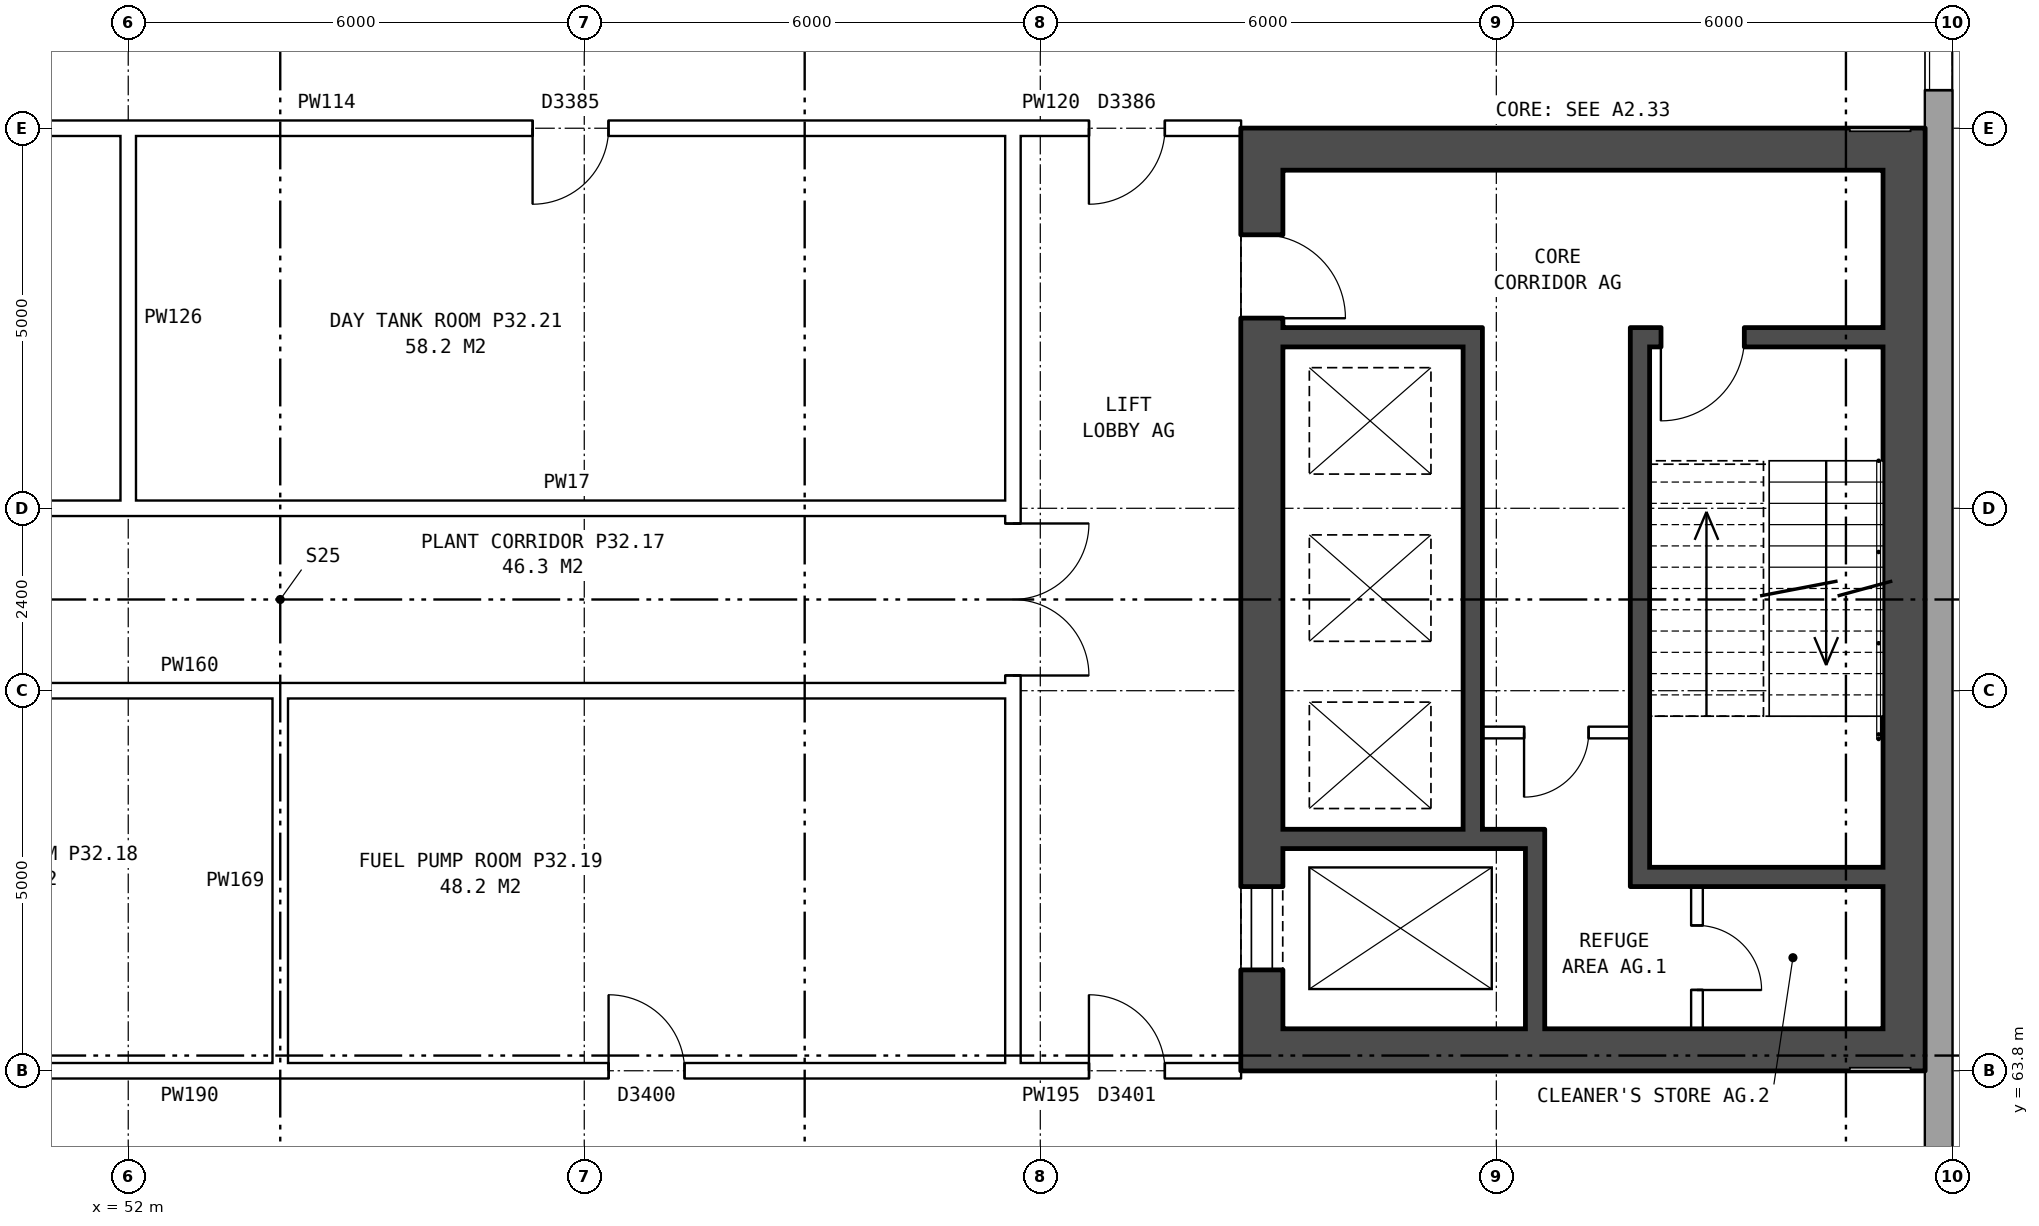
"""IFC4 building model, lengths in metres.
Left out: names, types, materials, properties, quantities, classifications, styles, units other than length and angle.
Written with IfcOpenShell. Run it as: python <this file> out.ifc"""

import sys

from ifc_helpers import new_model, si_unit, direction, frame, frame_2d, origin, place, context, subcontext, project, spatial, rectangle, extrude, element, fill, save


model = new_model("IFC4")
c1 = context("Model", 3, precision=1e-05, world=origin(), true_north=direction((0.0, 1.0)))
c2 = subcontext(c1, "Body", "Model", "MODEL_VIEW")
j1 = project(units=[si_unit("LENGTHUNIT", "METRE"), si_unit("PLANEANGLEUNIT", "RADIAN")], contexts=[c1])
p1 = place(None, origin())
s1 = spatial("IfcSite", under=j1, at=p1, CompositionType="ELEMENT")
p2 = place(p1, origin())
s2 = spatial("IfcBuilding", under=s1, at=p2, CompositionType="ELEMENT")
p3 = place(p2, frame((0.0, 0.0, 115.0)))
s3 = spatial("IfcBuildingStorey", under=s2, at=p3, CompositionType="ELEMENT", Elevation=115.0)
p4 = place(p3, frame((75.82, 57.075, 0.0), z_axis=(0.0, 0.0, 1.0), x_axis=(0.0, 1.0, 0.0)))
e1 = element("IfcWall", 1, at=p4, inside=s3, PredefinedType="STANDARD", context=c2, shape_type="SweptSolid", body=[
    extrude(rectangle(XDim=25.851, YDim=0.36, at=frame_2d((12.925, 0.0))), origin(), (0.0, 0.0, 1.0), 4.2),
])
p5 = place(p4, frame((2.9, 0.0, 1.5)))
e2 = element("IfcOpeningElement", 2, at=p5, cuts=e1, PredefinedType="OPENING", context=c2, shape_type="SweptSolid", body=[
    extrude(rectangle(XDim=0.6, YDim=1.2, at=frame_2d((0.3, 0.6))), frame((0.0, 0.19, 0.0), z_axis=(0.0, -1.0, 0.0), x_axis=(1.0, 0.0, 0.0)), (0.0, 0.0, 1.0), 0.38),
])
p6 = place(p4, frame((3.925, 0.0, 1.5)))
e3 = element("IfcOpeningElement", 3, at=p6, cuts=e1, PredefinedType="OPENING", context=c2, shape_type="SweptSolid", body=[
    extrude(rectangle(XDim=0.6, YDim=1.2, at=frame_2d((0.3, 0.6))), frame((0.0, 0.19, 0.0), z_axis=(0.0, -1.0, 0.0), x_axis=(1.0, 0.0, 0.0)), (0.0, 0.0, 1.0), 0.38),
])
p7 = place(p4, frame((19.625, 0.0, 1.5)))
e4 = element("IfcOpeningElement", 4, at=p7, cuts=e1, PredefinedType="OPENING", context=c2, shape_type="SweptSolid", body=[
    extrude(rectangle(XDim=1.6, YDim=1.2, at=frame_2d((0.8, 0.6))), frame((0.0, 0.19, 0.0), z_axis=(0.0, -1.0, 0.0), x_axis=(1.0, 0.0, 0.0)), (0.0, 0.0, 1.0), 0.38),
])
p8 = place(p4, frame((22.125, 0.0, 1.5)))
e5 = element("IfcOpeningElement", 5, at=p8, cuts=e1, PredefinedType="OPENING", context=c2, shape_type="SweptSolid", body=[
    extrude(rectangle(XDim=0.6, YDim=1.2, at=frame_2d((0.3, 0.6))), frame((0.0, 0.19, 0.0), z_axis=(0.0, -1.0, 0.0), x_axis=(1.0, 0.0, 0.0)), (0.0, 0.0, 1.0), 0.38),
])
p9 = place(p3, frame((66.915, 63.8, 0.0), z_axis=(0.0, 0.0, 1.0), x_axis=(0.0, 1.0, 0.0)))
e6 = element("IfcWall", 6, at=p9, inside=s3, PredefinedType="SHEAR", context=c2, shape_type="SweptSolid", body=[
    extrude(rectangle(XDim=12.4, YDim=0.55, at=frame_2d((6.2, 0.0))), origin(), (0.0, 0.0, 1.0), 4.2),
])
p10 = place(p9, frame((1.325, 0.0, 0.0)))
e7 = element("IfcOpeningElement", 7, at=p10, cuts=e6, PredefinedType="OPENING", context=c2, shape_type="SweptSolid", body=[
    extrude(rectangle(XDim=1.1, YDim=2.1, at=frame_2d((0.55, 1.05))), frame((0.0, 0.285, 0.0), z_axis=(0.0, -1.0, 0.0), x_axis=(1.0, 0.0, 0.0)), (0.0, 0.0, 1.0), 0.57),
])
p11 = place(p9, frame((9.9, 0.0, 0.0)))
e8 = element("IfcOpeningElement", 8, at=p11, cuts=e6, PredefinedType="OPENING", context=c2, shape_type="SweptSolid", body=[
    extrude(rectangle(XDim=1.1, YDim=2.1, at=frame_2d((0.55, 1.05))), frame((0.0, 0.285, 0.0), z_axis=(0.0, -1.0, 0.0), x_axis=(1.0, 0.0, 0.0)), (0.0, 0.0, 1.0), 0.57),
])
p12 = place(p3, frame((75.365, 63.8, 0.0), z_axis=(0.0, 0.0, 1.0), x_axis=(0.0, 1.0, 0.0)))
e9 = element("IfcWall", 9, at=p12, inside=s3, PredefinedType="SHEAR", context=c2, shape_type="SweptSolid", body=[
    extrude(rectangle(XDim=12.4, YDim=0.55, at=frame_2d((6.2, 0.0))), origin(), (0.0, 0.0, 1.0), 4.2),
])
for number, where, z_axis, x_axis in (
    (10, (67.19, 64.075, 0.0), (0.0, 0.0, 1.0), (1.0, 0.0, 0.0)),
    (11, (67.19, 75.925, 0.0), (0.0, 0.0, 1.0), (1.0, 0.0, 0.0)),
):
    element("IfcWall", number, at=place(p3, frame(where, z_axis=z_axis, x_axis=x_axis)), inside=s3, PredefinedType="SHEAR", context=c2, shape_type="SweptSolid", body=[
        extrude(rectangle(XDim=7.9, YDim=0.55, at=frame_2d((3.95, 0.0))), origin(), (0.0, 0.0, 1.0), 4.2),
    ])
p13 = place(p3, frame((72.015, 66.35, 0.0), z_axis=(0.0, 0.0, 1.0), x_axis=(1.0, 0.0, 0.0)))
e12 = element("IfcWall", 12, at=p13, inside=s3, PredefinedType="SHEAR", context=c2, shape_type="SweptSolid", body=[
    extrude(rectangle(XDim=3.075, YDim=0.25, at=frame_2d((1.538, 0.0))), origin(), (0.0, 0.0, 1.0), 4.2),
])
p14 = place(p3, frame((67.19, 66.85, 0.0), z_axis=(0.0, 0.0, 1.0), x_axis=(1.0, 0.0, 0.0)))
e13 = element("IfcWall", 13, at=p14, inside=s3, PredefinedType="SHEAR", context=c2, shape_type="SweptSolid", body=[
    extrude(rectangle(XDim=3.445, YDim=0.25, at=frame_2d((1.723, 0.0))), origin(), (0.0, 0.0, 1.0), 4.2),
])
p15 = place(p3, frame((69.815, 68.25, 0.0), z_axis=(0.0, 0.0, 1.0), x_axis=(1.0, 0.0, 0.0)))
e14 = element("IfcWall", 14, at=p15, inside=s3, PredefinedType="PARTITIONING", context=c2, shape_type="SweptSolid", body=[
    extrude(rectangle(XDim=1.95, YDim=0.15, at=frame_2d((0.975, 0.0))), origin(), (0.0, 0.0, 1.0), 4.2),
])
p16 = place(p15, frame((0.55, 0.0, 0.0)))
e15 = element("IfcOpeningElement", 15, at=p16, cuts=e14, PredefinedType="OPENING", context=c2, shape_type="SweptSolid", body=[
    extrude(rectangle(XDim=0.85, YDim=2.1, at=frame_2d((0.425, 1.05))), frame((0.0, 0.085, 0.0), z_axis=(0.0, -1.0, 0.0), x_axis=(1.0, 0.0, 0.0)), (0.0, 0.0, 1.0), 0.17),
])
p17 = place(p3, frame((67.19, 73.45, 0.0), z_axis=(0.0, 0.0, 1.0), x_axis=(1.0, 0.0, 0.0)))
e16 = element("IfcWall", 16, at=p17, inside=s3, PredefinedType="SHEAR", context=c2, shape_type="SweptSolid", body=[
    extrude(rectangle(XDim=2.375, YDim=0.25, at=frame_2d((1.188, 0.0))), origin(), (0.0, 0.0, 1.0), 4.2),
])
p18 = place(p3, frame((72.015, 73.45, 0.0), z_axis=(0.0, 0.0, 1.0), x_axis=(1.0, 0.0, 0.0)))
e17 = element("IfcWall", 17, at=p18, inside=s3, PredefinedType="SHEAR", context=c2, shape_type="SweptSolid", body=[
    extrude(rectangle(XDim=3.075, YDim=0.25, at=frame_2d((1.538, 0.0))), origin(), (0.0, 0.0, 1.0), 4.2),
])
p19 = place(p18, frame((0.15, 0.0, 0.0)))
e18 = element("IfcOpeningElement", 18, at=p19, cuts=e17, PredefinedType="OPENING", context=c2, shape_type="SweptSolid", body=[
    extrude(rectangle(XDim=1.1, YDim=2.1, at=frame_2d((0.55, 1.05))), frame((0.0, 0.135, 0.0), z_axis=(0.0, -1.0, 0.0), x_axis=(1.0, 0.0, 0.0)), (0.0, 0.0, 1.0), 0.27),
])
p20 = place(p3, frame((69.69, 66.975, 0.0), z_axis=(0.0, 0.0, 1.0), x_axis=(0.0, 1.0, 0.0)))
e19 = element("IfcWall", 19, at=p20, inside=s3, PredefinedType="SHEAR", context=c2, shape_type="SweptSolid", body=[
    extrude(rectangle(XDim=6.6, YDim=0.25, at=frame_2d((3.3, 0.0))), origin(), (0.0, 0.0, 1.0), 4.2),
])
p21 = place(p3, frame((70.51, 64.35, 0.0), z_axis=(0.0, 0.0, 1.0), x_axis=(0.0, 1.0, 0.0)))
e20 = element("IfcWall", 20, at=p21, inside=s3, PredefinedType="SHEAR", context=c2, shape_type="SweptSolid", body=[
    extrude(rectangle(XDim=2.375, YDim=0.25, at=frame_2d((1.188, 0.0))), origin(), (0.0, 0.0, 1.0), 4.2),
])
p22 = place(p3, frame((71.89, 66.225, 0.0), z_axis=(0.0, 0.0, 1.0), x_axis=(0.0, 1.0, 0.0)))
e21 = element("IfcWall", 21, at=p22, inside=s3, PredefinedType="SHEAR", context=c2, shape_type="SweptSolid", body=[
    extrude(rectangle(XDim=7.35, YDim=0.25, at=frame_2d((3.675, 0.0))), origin(), (0.0, 0.0, 1.0), 4.2),
])
p23 = place(p3, frame((72.64, 64.35, 0.0), z_axis=(0.0, 0.0, 1.0), x_axis=(0.0, 1.0, 0.0)))
e22 = element("IfcWall", 22, at=p23, inside=s3, PredefinedType="PARTITIONING", context=c2, shape_type="SweptSolid", body=[
    extrude(rectangle(XDim=1.875, YDim=0.15, at=frame_2d((0.938, 0.0))), origin(), (0.0, 0.0, 1.0), 4.2),
])
p24 = place(p23, frame((0.512, 0.0, 0.0)))
e23 = element("IfcOpeningElement", 23, at=p24, cuts=e22, PredefinedType="OPENING", context=c2, shape_type="SweptSolid", body=[
    extrude(rectangle(XDim=0.85, YDim=2.1, at=frame_2d((0.425, 1.05))), frame((0.0, 0.085, 0.0), z_axis=(0.0, -1.0, 0.0), x_axis=(1.0, 0.0, 0.0)), (0.0, 0.0, 1.0), 0.17),
])
p25 = place(p3, frame((63.64, 63.9, 0.0), z_axis=(0.0, 0.0, 1.0), x_axis=(0.0, 1.0, 0.0)))
e24 = element("IfcWall", 24, at=p25, inside=s3, PredefinedType="PARTITIONING", context=c2, shape_type="SweptSolid", body=[
    extrude(rectangle(XDim=12.2, YDim=0.2, at=frame_2d((6.1, 0.0))), origin(), (0.0, 0.0, 1.0), 4.2),
])
p26 = place(p25, frame((5.1, 0.0, 0.0)))
e25 = element("IfcOpeningElement", 25, at=p26, cuts=e24, PredefinedType="OPENING", context=c2, shape_type="SweptSolid", body=[
    extrude(rectangle(XDim=2.0, YDim=2.1, at=frame_2d((1.0, 1.05))), frame((0.0, 0.11, 0.0), z_axis=(0.0, -1.0, 0.0), x_axis=(1.0, 0.0, 0.0)), (0.0, 0.0, 1.0), 0.22),
])
p27 = place(p3, frame((44.36, 63.8, 0.0), z_axis=(0.0, 0.0, 1.0), x_axis=(1.0, 0.0, 0.0)))
e26 = element("IfcWall", 26, at=p27, inside=s3, PredefinedType="PARTITIONING", context=c2, shape_type="SweptSolid", body=[
    extrude(rectangle(XDim=19.28, YDim=0.2, at=frame_2d((9.64, 0.0))), origin(), (0.0, 0.0, 1.0), 4.2),
])
p28 = place(p27, frame((4.32, 0.0, 0.0)))
e27 = element("IfcOpeningElement", 27, at=p28, cuts=e26, PredefinedType="OPENING", context=c2, shape_type="SweptSolid", body=[
    extrude(rectangle(XDim=1.0, YDim=2.1, at=frame_2d((0.5, 1.05))), frame((0.0, 0.11, 0.0), z_axis=(0.0, -1.0, 0.0), x_axis=(1.0, 0.0, 0.0)), (0.0, 0.0, 1.0), 0.22),
])
p29 = place(p27, frame((13.96, 0.0, 0.0)))
e28 = element("IfcOpeningElement", 28, at=p29, cuts=e26, PredefinedType="OPENING", context=c2, shape_type="SweptSolid", body=[
    extrude(rectangle(XDim=1.0, YDim=2.1, at=frame_2d((0.5, 1.05))), frame((0.0, 0.11, 0.0), z_axis=(0.0, -1.0, 0.0), x_axis=(1.0, 0.0, 0.0)), (0.0, 0.0, 1.0), 0.22),
])
p30 = place(p3, frame((63.64, 63.8, 0.0), z_axis=(0.0, 0.0, 1.0), x_axis=(1.0, 0.0, 0.0)))
e29 = element("IfcWall", 29, at=p30, inside=s3, PredefinedType="PARTITIONING", context=c2, shape_type="SweptSolid", body=[
    extrude(rectangle(XDim=3.0, YDim=0.2, at=frame_2d((1.5, 0.0))), origin(), (0.0, 0.0, 1.0), 4.2),
])
p31 = place(p30, frame((1.0, 0.0, 0.0)))
e30 = element("IfcOpeningElement", 30, at=p31, cuts=e29, PredefinedType="OPENING", context=c2, shape_type="SweptSolid", body=[
    extrude(rectangle(XDim=1.0, YDim=2.1, at=frame_2d((0.5, 1.05))), frame((0.0, 0.11, 0.0), z_axis=(0.0, -1.0, 0.0), x_axis=(1.0, 0.0, 0.0)), (0.0, 0.0, 1.0), 0.22),
])
p32 = place(p3, frame((44.36, 68.8, 0.0), z_axis=(0.0, 0.0, 1.0), x_axis=(1.0, 0.0, 0.0)))
e31 = element("IfcWall", 31, at=p32, inside=s3, PredefinedType="PARTITIONING", context=c2, shape_type="SweptSolid", body=[
    extrude(rectangle(XDim=19.28, YDim=0.2, at=frame_2d((9.64, 0.0))), origin(), (0.0, 0.0, 1.0), 4.2),
])
p33 = place(p3, frame((51.9, 71.2, 0.0), z_axis=(0.0, 0.0, 1.0), x_axis=(1.0, 0.0, 0.0)))
e32 = element("IfcWall", 32, at=p33, inside=s3, PredefinedType="PARTITIONING", context=c2, shape_type="SweptSolid", body=[
    extrude(rectangle(XDim=11.74, YDim=0.2, at=frame_2d((5.87, 0.0))), origin(), (0.0, 0.0, 1.0), 4.2),
])
p34 = place(p3, frame((44.36, 71.2, 0.0), z_axis=(0.0, 0.0, 1.0), x_axis=(1.0, 0.0, 0.0)))
e33 = element("IfcWall", 33, at=p34, inside=s3, PredefinedType="PARTITIONING", context=c2, shape_type="SweptSolid", body=[
    extrude(rectangle(XDim=7.74, YDim=0.2, at=frame_2d((3.87, 0.0))), origin(), (0.0, 0.0, 1.0), 4.2),
])
p35 = place(p3, frame((51.9, 76.2, 0.0), z_axis=(0.0, 0.0, 1.0), x_axis=(1.0, 0.0, 0.0)))
e34 = element("IfcWall", 34, at=p35, inside=s3, PredefinedType="PARTITIONING", context=c2, shape_type="SweptSolid", body=[
    extrude(rectangle(XDim=11.74, YDim=0.2, at=frame_2d((5.87, 0.0))), origin(), (0.0, 0.0, 1.0), 4.2),
])
p36 = place(p35, frame((5.42, 0.0, 0.0)))
e35 = element("IfcOpeningElement", 35, at=p36, cuts=e34, PredefinedType="OPENING", context=c2, shape_type="SweptSolid", body=[
    extrude(rectangle(XDim=1.0, YDim=2.1, at=frame_2d((0.5, 1.05))), frame((0.0, 0.11, 0.0), z_axis=(0.0, -1.0, 0.0), x_axis=(1.0, 0.0, 0.0)), (0.0, 0.0, 1.0), 0.22),
])
p37 = place(p3, frame((44.36, 76.2, 0.0), z_axis=(0.0, 0.0, 1.0), x_axis=(1.0, 0.0, 0.0)))
e36 = element("IfcWall", 36, at=p37, inside=s3, PredefinedType="PARTITIONING", context=c2, shape_type="SweptSolid", body=[
    extrude(rectangle(XDim=7.74, YDim=0.2, at=frame_2d((3.87, 0.0))), origin(), (0.0, 0.0, 1.0), 4.2),
])
p38 = place(p37, frame((3.32, 0.0, 0.0)))
e37 = element("IfcOpeningElement", 37, at=p38, cuts=e36, PredefinedType="OPENING", context=c2, shape_type="SweptSolid", body=[
    extrude(rectangle(XDim=1.0, YDim=2.1, at=frame_2d((0.5, 1.05))), frame((0.0, 0.11, 0.0), z_axis=(0.0, -1.0, 0.0), x_axis=(1.0, 0.0, 0.0)), (0.0, 0.0, 1.0), 0.22),
])
p39 = place(p3, frame((63.64, 76.2, 0.0), z_axis=(0.0, 0.0, 1.0), x_axis=(1.0, 0.0, 0.0)))
e38 = element("IfcWall", 38, at=p39, inside=s3, PredefinedType="PARTITIONING", context=c2, shape_type="SweptSolid", body=[
    extrude(rectangle(XDim=3.0, YDim=0.2, at=frame_2d((1.5, 0.0))), origin(), (0.0, 0.0, 1.0), 4.2),
])
p40 = place(p39, frame((1.0, 0.0, 0.0)))
e39 = element("IfcOpeningElement", 39, at=p40, cuts=e38, PredefinedType="OPENING", context=c2, shape_type="SweptSolid", body=[
    extrude(rectangle(XDim=1.0, YDim=2.1, at=frame_2d((0.5, 1.05))), frame((0.0, 0.11, 0.0), z_axis=(0.0, -1.0, 0.0), x_axis=(1.0, 0.0, 0.0)), (0.0, 0.0, 1.0), 0.22),
])
for number, where, z_axis, x_axis in (
    (40, (52.0, 71.1, 0.0), (0.0, 0.0, 1.0), (0.0, 1.0, 0.0)),
    (41, (54.0, 63.7, 0.0), (0.0, 0.0, 1.0), (0.0, 1.0, 0.0)),
):
    element("IfcWall", number, at=place(p3, frame(where, z_axis=z_axis, x_axis=x_axis)), inside=s3, PredefinedType="PARTITIONING", context=c2, shape_type="SweptSolid", body=[
        extrude(rectangle(XDim=5.2, YDim=0.2, at=frame_2d((2.6, 0.0))), origin(), (0.0, 0.0, 1.0), 4.2),
    ])
p41 = place(p7, origin())
e42 = element("IfcWindow", 42, at=p41, inside=s3, PartitioningType="DOUBLE_PANEL_HORIZONTAL", PredefinedType="WINDOW", context=c2, shape_type="SweptSolid", body=[
    extrude(rectangle(XDim=1.6, YDim=1.2, at=frame_2d((0.8, 0.6))), frame((0.0, 0.15, 0.0), z_axis=(0.0, -1.0, 0.0), x_axis=(1.0, 0.0, 0.0)), (0.0, 0.0, 1.0), 0.06),
])
fill(e4, e42)
p42 = place(p10, origin())
e43 = element("IfcDoor", 43, at=p42, inside=s3, OperationType="DOUBLE_DOOR_SLIDING", PredefinedType="DOOR", context=c2, shape_type="SweptSolid", body=[
    extrude(rectangle(XDim=1.1, YDim=2.1, at=frame_2d((0.55, 1.05))), frame((0.0, -0.21, 0.0), z_axis=(0.0, -1.0, 0.0), x_axis=(1.0, 0.0, 0.0)), (0.0, 0.0, 1.0), 0.05),
])
fill(e7, e43)
p43 = place(p11, frame((1.1, 0.0, 0.0), z_axis=(0.0, 0.0, 1.0), x_axis=(-1.0, 0.0, 0.0)))
e44 = element("IfcDoor", 44, at=p43, inside=s3, OperationType="SINGLE_SWING_RIGHT", PredefinedType="DOOR", context=c2, shape_type="SweptSolid", body=[
    extrude(rectangle(XDim=1.1, YDim=2.1, at=frame_2d((0.55, 1.05))), frame((0.0, 0.26, 0.0), z_axis=(0.0, -1.0, 0.0), x_axis=(1.0, 0.0, 0.0)), (0.0, 0.0, 1.0), 0.05),
])
fill(e8, e44)
p44 = place(p19, frame((1.1, 0.0, 0.0), z_axis=(0.0, 0.0, 1.0), x_axis=(-1.0, 0.0, 0.0)))
e45 = element("IfcDoor", 45, at=p44, inside=s3, OperationType="SINGLE_SWING_RIGHT", PredefinedType="DOOR", context=c2, shape_type="SweptSolid", body=[
    extrude(rectangle(XDim=1.1, YDim=2.1, at=frame_2d((0.55, 1.05))), frame((0.0, 0.025, 0.0), z_axis=(0.0, -1.0, 0.0), x_axis=(1.0, 0.0, 0.0)), (0.0, 0.0, 1.0), 0.05),
])
fill(e18, e45)
p45 = place(p16, frame((0.85, 0.0, 0.0), z_axis=(0.0, 0.0, 1.0), x_axis=(-1.0, 0.0, 0.0)))
e46 = element("IfcDoor", 46, at=p45, inside=s3, OperationType="SINGLE_SWING_RIGHT", PredefinedType="DOOR", context=c2, shape_type="SweptSolid", body=[
    extrude(rectangle(XDim=0.85, YDim=2.1, at=frame_2d((0.425, 1.05))), frame((0.0, 0.025, 0.0), z_axis=(0.0, -1.0, 0.0), x_axis=(1.0, 0.0, 0.0)), (0.0, 0.0, 1.0), 0.05),
])
fill(e15, e46)
p46 = place(p24, frame((0.85, 0.0, 0.0), z_axis=(0.0, 0.0, 1.0), x_axis=(-1.0, 0.0, 0.0)))
e47 = element("IfcDoor", 47, at=p46, inside=s3, OperationType="SINGLE_SWING_RIGHT", PredefinedType="DOOR", context=c2, shape_type="SweptSolid", body=[
    extrude(rectangle(XDim=0.85, YDim=2.1, at=frame_2d((0.425, 1.05))), frame((0.0, 0.025, 0.0), z_axis=(0.0, -1.0, 0.0), x_axis=(1.0, 0.0, 0.0)), (0.0, 0.0, 1.0), 0.05),
])
fill(e23, e47)
p47 = place(p26, frame((2.0, 0.0, 0.0), z_axis=(0.0, 0.0, 1.0), x_axis=(-1.0, 0.0, 0.0)))
e48 = element("IfcDoor", 48, at=p47, inside=s3, OperationType="DOUBLE_DOOR_SINGLE_SWING", PredefinedType="DOOR", context=c2, shape_type="SweptSolid", body=[
    extrude(rectangle(XDim=2.0, YDim=2.1, at=frame_2d((1.0, 1.05))), frame((0.0, 0.025, 0.0), z_axis=(0.0, -1.0, 0.0), x_axis=(1.0, 0.0, 0.0)), (0.0, 0.0, 1.0), 0.05),
])
fill(e25, e48)
p48 = place(p29, origin())
e49 = element("IfcDoor", 49, at=p48, inside=s3, OperationType="SINGLE_SWING_LEFT", PredefinedType="DOOR", context=c2, shape_type="SweptSolid", body=[
    extrude(rectangle(XDim=1.0, YDim=2.1, at=frame_2d((0.5, 1.05))), frame((0.0, 0.025, 0.0), z_axis=(0.0, -1.0, 0.0), x_axis=(1.0, 0.0, 0.0)), (0.0, 0.0, 1.0), 0.05),
])
fill(e28, e49)
p49 = place(p31, origin())
e50 = element("IfcDoor", 50, at=p49, inside=s3, OperationType="SINGLE_SWING_LEFT", PredefinedType="DOOR", context=c2, shape_type="SweptSolid", body=[
    extrude(rectangle(XDim=1.0, YDim=2.1, at=frame_2d((0.5, 1.05))), frame((0.0, 0.025, 0.0), z_axis=(0.0, -1.0, 0.0), x_axis=(1.0, 0.0, 0.0)), (0.0, 0.0, 1.0), 0.05),
])
fill(e30, e50)
p50 = place(p36, frame((1.0, 0.0, 0.0), z_axis=(0.0, 0.0, 1.0), x_axis=(-1.0, 0.0, 0.0)))
e51 = element("IfcDoor", 51, at=p50, inside=s3, OperationType="SINGLE_SWING_RIGHT", PredefinedType="DOOR", context=c2, shape_type="SweptSolid", body=[
    extrude(rectangle(XDim=1.0, YDim=2.1, at=frame_2d((0.5, 1.05))), frame((0.0, 0.025, 0.0), z_axis=(0.0, -1.0, 0.0), x_axis=(1.0, 0.0, 0.0)), (0.0, 0.0, 1.0), 0.05),
])
fill(e35, e51)
p51 = place(p40, frame((1.0, 0.0, 0.0), z_axis=(0.0, 0.0, 1.0), x_axis=(-1.0, 0.0, 0.0)))
e52 = element("IfcDoor", 52, at=p51, inside=s3, OperationType="SINGLE_SWING_RIGHT", PredefinedType="DOOR", context=c2, shape_type="SweptSolid", body=[
    extrude(rectangle(XDim=1.0, YDim=2.1, at=frame_2d((0.5, 1.05))), frame((0.0, 0.025, 0.0), z_axis=(0.0, -1.0, 0.0), x_axis=(1.0, 0.0, 0.0)), (0.0, 0.0, 1.0), 0.05),
])
fill(e39, e52)
save(model, sys.argv[1])
